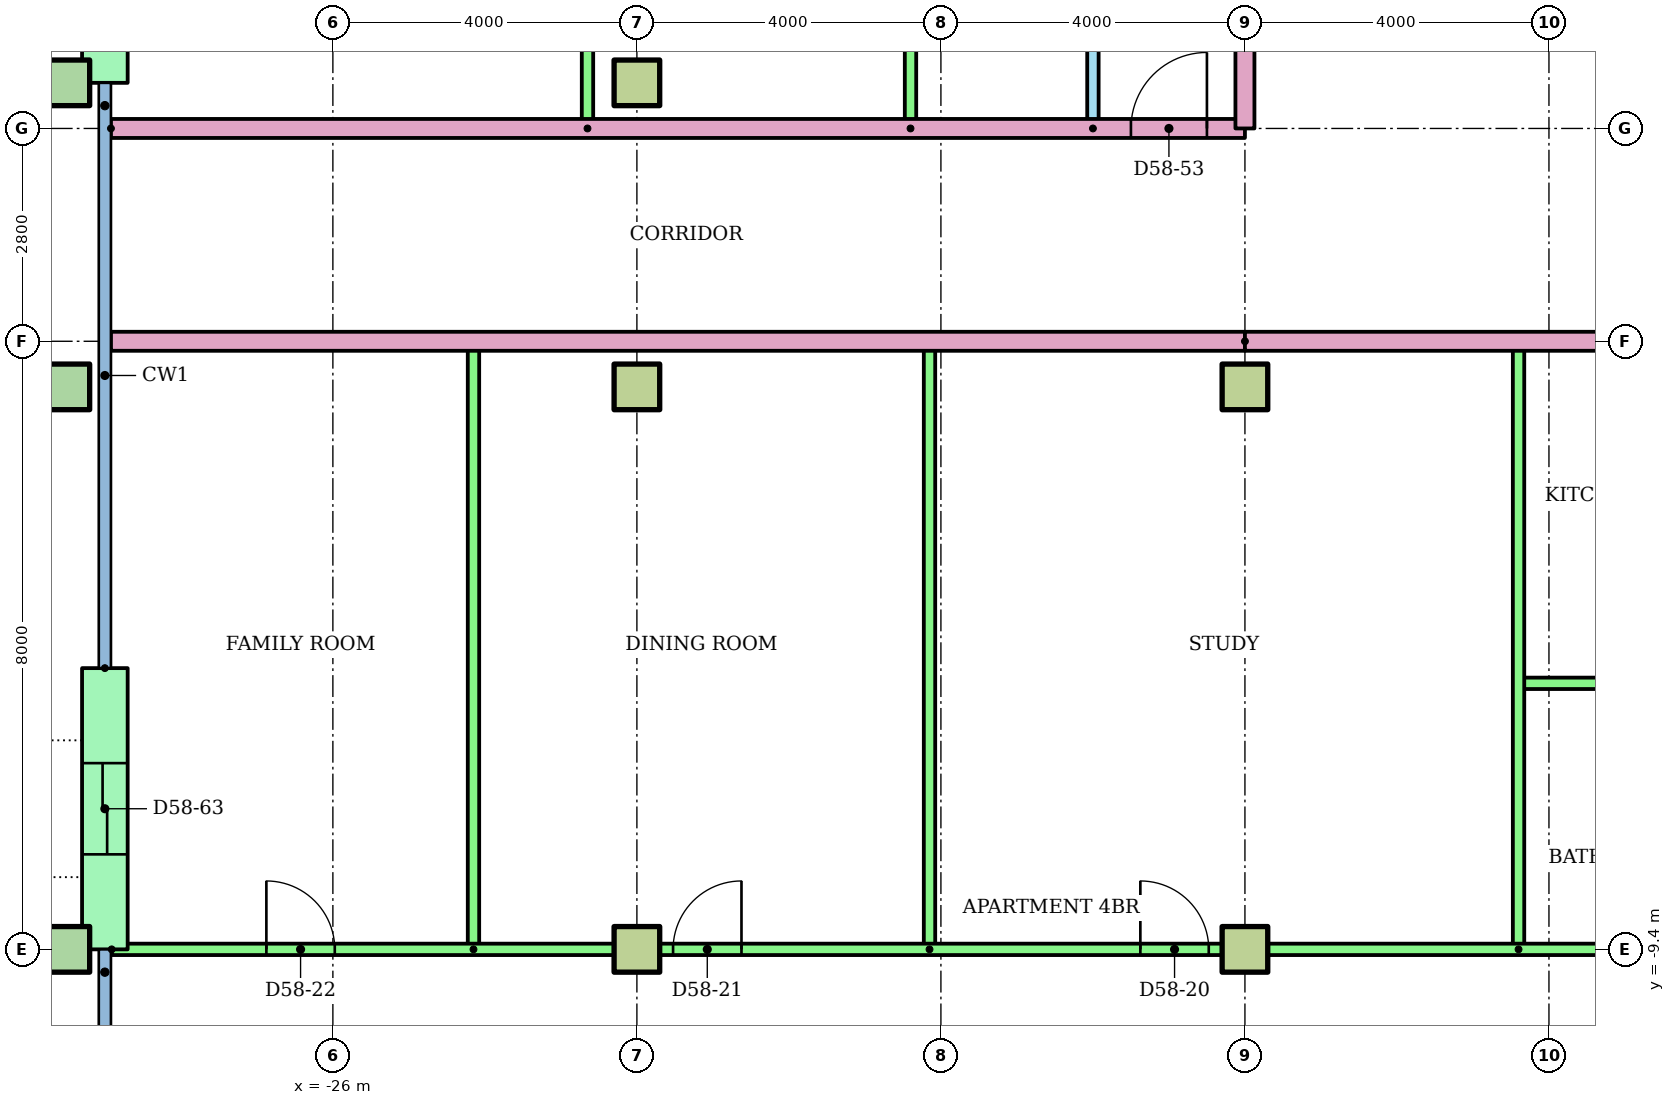
"""IFC4 building model, lengths in metres.
Left out: names, types, materials, properties, quantities, classifications, styles, units other than length and angle.
Written with IfcOpenShell. Run it as: python <this file> out.ifc"""

import sys

from ifc_helpers import new_model, si_unit, direction, frame, frame_2d, origin, origin_2d, place, context, subcontext, project, spatial, rectangle, hollow_rectangle, extrude, element, fill, save


model = new_model("IFC4")
c1 = context("Model", 3, precision=1e-05, world=origin(), true_north=direction((0.0, 1.0)))
c2 = subcontext(c1, "Body", "Model", "MODEL_VIEW")
j1 = project(units=[si_unit("LENGTHUNIT", "METRE"), si_unit("PLANEANGLEUNIT", "RADIAN")], contexts=[c1])
p1 = place(None, origin())
s1 = spatial("IfcSite", under=j1, at=p1, CompositionType="ELEMENT")
p2 = place(p1, origin())
s2 = spatial("IfcBuilding", under=s1, at=p2, CompositionType="ELEMENT")
p3 = place(p2, frame((0.0, 0.0, 223.6)))
s3 = spatial("IfcBuildingStorey", under=s2, at=p3, CompositionType="ELEMENT", Elevation=223.6)
p4 = place(p3, frame((-29.5, -9.4, 0.0)))
e1 = element("IfcColumn", 1, at=p4, inside=s3, PredefinedType="COLUMN", context=c2, shape_type="SweptSolid", body=[
    extrude(hollow_rectangle(XDim=0.6, YDim=0.6, WallThickness=0.03, at=origin_2d()), origin(), (0.0, 0.0, 1.0), 3.2),
])
for number, where in (
    (2, (-22.0, -9.4, 0.0)),
    (3, (-14.0, -9.4, 0.0)),
):
    element("IfcColumn", number, at=place(p3, frame(where)), inside=s3, PredefinedType="COLUMN", context=c2, shape_type="SweptSolid", body=[
        extrude(rectangle(XDim=0.6, YDim=0.6, at=origin_2d()), origin(), (0.0, 0.0, 1.0), 3.2),
    ])
p5 = place(p3, frame((-29.5, -2.0, 0.0)))
e4 = element("IfcColumn", 4, at=p5, inside=s3, PredefinedType="COLUMN", context=c2, shape_type="SweptSolid", body=[
    extrude(hollow_rectangle(XDim=0.6, YDim=0.6, WallThickness=0.03, at=origin_2d()), origin(), (0.0, 0.0, 1.0), 3.2),
])
for number, where in (
    (5, (-22.0, -2.0, 0.0)),
    (6, (-14.0, -2.0, 0.0)),
):
    element("IfcColumn", number, at=place(p3, frame(where)), inside=s3, PredefinedType="COLUMN", context=c2, shape_type="SweptSolid", body=[
        extrude(rectangle(XDim=0.6, YDim=0.6, at=origin_2d()), origin(), (0.0, 0.0, 1.0), 3.2),
    ])
p6 = place(p3, frame((-29.5, 2.0, 0.0)))
e7 = element("IfcColumn", 7, at=p6, inside=s3, PredefinedType="COLUMN", context=c2, shape_type="SweptSolid", body=[
    extrude(hollow_rectangle(XDim=0.6, YDim=0.6, WallThickness=0.03, at=origin_2d()), origin(), (0.0, 0.0, 1.0), 3.2),
])
p7 = place(p3, frame((-22.0, 2.0, 0.0)))
e8 = element("IfcColumn", 8, at=p7, inside=s3, PredefinedType="COLUMN", context=c2, shape_type="SweptSolid", body=[
    extrude(rectangle(XDim=0.6, YDim=0.6, at=origin_2d()), origin(), (0.0, 0.0, 1.0), 3.2),
])
p8 = place(p3, frame((-29.0, 6.5, 0.0), z_axis=(0.0, 0.0, 1.0), x_axis=(0.0, -1.0, 0.0)))
e9 = element("IfcWall", 9, at=p8, inside=s3, PredefinedType="STANDARD", context=c2, shape_type="SweptSolid", body=[
    extrude(rectangle(XDim=4.5, YDim=0.6, at=frame_2d((2.25, 0.0))), origin(), (0.0, 0.0, 1.0), 2.92),
])
p9 = place(p8, frame((1.65, 0.0, 0.0)))
e10 = element("IfcOpeningElement", 10, at=p9, cuts=e9, PredefinedType="OPENING", context=c2, shape_type="SweptSolid", body=[
    extrude(rectangle(XDim=1.2, YDim=2.1, at=frame_2d((0.6, 1.05))), frame((0.0, 0.31, 0.0), z_axis=(0.0, -1.0, 0.0), x_axis=(1.0, 0.0, 0.0)), (0.0, 0.0, 1.0), 0.62),
])
p10 = place(p3, frame((-29.0, -5.7, 0.0), z_axis=(0.0, 0.0, 1.0), x_axis=(0.0, -1.0, 0.0)))
e11 = element("IfcWall", 11, at=p10, inside=s3, PredefinedType="STANDARD", context=c2, shape_type="SweptSolid", body=[
    extrude(rectangle(XDim=3.7, YDim=0.6, at=frame_2d((1.85, 0.0))), origin(), (0.0, 0.0, 1.0), 2.92),
])
p11 = place(p10, frame((1.25, 0.0, 0.0)))
e12 = element("IfcOpeningElement", 12, at=p11, cuts=e11, PredefinedType="OPENING", context=c2, shape_type="SweptSolid", body=[
    extrude(rectangle(XDim=1.2, YDim=2.1, at=frame_2d((0.6, 1.05))), frame((0.0, 0.31, 0.0), z_axis=(0.0, -1.0, 0.0), x_axis=(1.0, 0.0, 0.0)), (0.0, 0.0, 1.0), 0.62),
])
p12 = place(p3, frame((-8.0, -5.9, 0.0), z_axis=(0.0, 0.0, 1.0), x_axis=(-1.0, 0.0, 0.0)))
e13 = element("IfcWall", 13, at=p12, inside=s3, PredefinedType="PARTITIONING", context=c2, shape_type="SweptSolid", body=[
    extrude(rectangle(XDim=2.4, YDim=0.15, at=frame_2d((1.2, 0.0))), origin(), (0.0, 0.0, 1.0), 2.4),
])
for number, where, z_axis, x_axis in (
    (14, (-10.4, -9.4, 0.0), (0.0, 0.0, 1.0), (0.0, 1.0, 0.0)),
    (15, (-18.15, -9.4, 0.0), (0.0, 0.0, 1.0), (0.0, 1.0, 0.0)),
    (16, (-24.15, -9.4, 0.0), (0.0, 0.0, 1.0), (0.0, 1.0, 0.0)),
):
    element("IfcWall", number, at=place(p3, frame(where, z_axis=z_axis, x_axis=x_axis)), inside=s3, PredefinedType="PARTITIONING", context=c2, shape_type="SweptSolid", body=[
        extrude(rectangle(XDim=8.0, YDim=0.15, at=frame_2d((4.0, 0.0))), origin(), (0.0, 0.0, 1.0), 2.4),
    ])
p13 = place(p3, frame((-28.91, -9.4, 0.0)))
e17 = element("IfcWall", 17, at=p13, inside=s3, PredefinedType="PARTITIONING", context=c2, shape_type="SweptSolid", body=[
    extrude(rectangle(XDim=20.91, YDim=0.15, at=frame_2d((10.455, 0.0))), origin(), (0.0, 0.0, 1.0), 2.4),
])
p14 = place(p13, frame((13.534, 0.0, 0.0)))
e18 = element("IfcOpeningElement", 18, at=p14, cuts=e17, PredefinedType="OPENING", context=c2, shape_type="SweptSolid", body=[
    extrude(rectangle(XDim=0.9, YDim=2.1, at=frame_2d((0.45, 1.05))), frame((0.0, 0.085, 0.0), z_axis=(0.0, -1.0, 0.0), x_axis=(1.0, 0.0, 0.0)), (0.0, 0.0, 1.0), 0.17),
])
p15 = place(p13, frame((7.386, 0.0, 0.0)))
e19 = element("IfcOpeningElement", 19, at=p15, cuts=e17, PredefinedType="OPENING", context=c2, shape_type="SweptSolid", body=[
    extrude(rectangle(XDim=0.9, YDim=2.1, at=frame_2d((0.45, 1.05))), frame((0.0, 0.085, 0.0), z_axis=(0.0, -1.0, 0.0), x_axis=(1.0, 0.0, 0.0)), (0.0, 0.0, 1.0), 0.17),
])
p16 = place(p13, frame((2.035, 0.0, 0.0)))
e20 = element("IfcOpeningElement", 20, at=p16, cuts=e17, PredefinedType="OPENING", context=c2, shape_type="SweptSolid", body=[
    extrude(rectangle(XDim=0.9, YDim=2.1, at=frame_2d((0.45, 1.05))), frame((0.0, 0.085, 0.0), z_axis=(0.0, -1.0, 0.0), x_axis=(1.0, 0.0, 0.0)), (0.0, 0.0, 1.0), 0.17),
])
p17 = place(p3, frame((-14.0, -1.4, 0.0), z_axis=(0.0, 0.0, 1.0), x_axis=(-1.0, 0.0, 0.0)))
e21 = element("IfcWall", 21, at=p17, inside=s3, PredefinedType="PARTITIONING", context=c2, shape_type="SweptSolid", body=[
    extrude(rectangle(XDim=14.92, YDim=0.25, at=frame_2d((7.46, 0.0))), origin(), (0.0, 0.0, 1.0), 2.4),
])
p18 = place(p3, frame((-16.0, 1.4, 0.0), z_axis=(0.0, 0.0, 1.0), x_axis=(0.0, 1.0, 0.0)))
e22 = element("IfcWall", 22, at=p18, inside=s3, PredefinedType="PARTITIONING", context=c2, shape_type="SweptSolid", body=[
    extrude(rectangle(XDim=10.4, YDim=0.15, at=frame_2d((5.2, 0.0))), origin(), (0.0, 0.0, 1.0), 2.4),
])
p19 = place(p18, frame((2.425, 0.0, 0.0)))
e23 = element("IfcOpeningElement", 23, at=p19, cuts=e22, PredefinedType="OPENING", context=c2, shape_type="SweptSolid", body=[
    extrude(rectangle(XDim=0.9, YDim=2.1, at=frame_2d((0.45, 1.05))), frame((0.0, 0.085, 0.0), z_axis=(0.0, -1.0, 0.0), x_axis=(1.0, 0.0, 0.0)), (0.0, 0.0, 1.0), 0.17),
])
p20 = place(p18, frame((7.675, 0.0, 0.0)))
e24 = element("IfcOpeningElement", 24, at=p20, cuts=e22, PredefinedType="OPENING", context=c2, shape_type="SweptSolid", body=[
    extrude(rectangle(XDim=0.8, YDim=2.1, at=frame_2d((0.4, 1.05))), frame((0.0, 0.085, 0.0), z_axis=(0.0, -1.0, 0.0), x_axis=(1.0, 0.0, 0.0)), (0.0, 0.0, 1.0), 0.17),
])
for number, where, z_axis, x_axis in (
    (25, (-18.4, 1.4, 0.0), (0.0, 0.0, 1.0), (0.0, 1.0, 0.0)),
    (26, (-22.65, 1.4, 0.0), (0.0, 0.0, 1.0), (0.0, 1.0, 0.0)),
):
    element("IfcWall", number, at=place(p3, frame(where, z_axis=z_axis, x_axis=x_axis)), inside=s3, PredefinedType="PARTITIONING", context=c2, shape_type="SweptSolid", body=[
        extrude(rectangle(XDim=10.4, YDim=0.15, at=frame_2d((5.2, 0.0))), origin(), (0.0, 0.0, 1.0), 2.4),
    ])
p21 = place(p3, frame((-28.92, 1.4, 0.0)))
e27 = element("IfcWall", 27, at=p21, inside=s3, PredefinedType="PARTITIONING", context=c2, shape_type="SweptSolid", body=[
    extrude(rectangle(XDim=14.92, YDim=0.25, at=frame_2d((7.46, 0.0))), origin(), (0.0, 0.0, 1.0), 2.4),
])
p22 = place(p21, frame((13.42, 0.0, 0.0)))
e28 = element("IfcOpeningElement", 28, at=p22, cuts=e27, PredefinedType="OPENING", context=c2, shape_type="SweptSolid", body=[
    extrude(rectangle(XDim=1.0, YDim=2.1, at=frame_2d((0.5, 1.05))), frame((0.0, 0.135, 0.0), z_axis=(0.0, -1.0, 0.0), x_axis=(1.0, 0.0, 0.0)), (0.0, 0.0, 1.0), 0.27),
])
p23 = place(p3, frame((14.0, -1.4, 0.0), z_axis=(0.0, 0.0, 1.0), x_axis=(-1.0, 0.0, 0.0)))
e29 = element("IfcWall", 29, at=p23, inside=s3, PredefinedType="PARTITIONING", context=c2, shape_type="SweptSolid", body=[
    extrude(rectangle(XDim=28.0, YDim=0.25, at=frame_2d((14.0, 0.0))), origin(), (0.0, 0.0, 1.0), 2.4),
])
p24 = place(p23, frame((20.5, 0.0, 0.0)))
e30 = element("IfcOpeningElement", 30, at=p24, cuts=e29, PredefinedType="OPENING", context=c2, shape_type="SweptSolid", body=[
    extrude(rectangle(XDim=1.0, YDim=2.1, at=frame_2d((0.5, 1.05))), frame((0.0, 0.135, 0.0), z_axis=(0.0, -1.0, 0.0), x_axis=(1.0, 0.0, 0.0)), (0.0, 0.0, 1.0), 0.27),
])
p25 = place(p23, frame((12.5, 0.0, 0.0)))
e31 = element("IfcOpeningElement", 31, at=p25, cuts=e29, PredefinedType="OPENING", context=c2, shape_type="SweptSolid", body=[
    extrude(rectangle(XDim=1.0, YDim=2.1, at=frame_2d((0.5, 1.05))), frame((0.0, 0.135, 0.0), z_axis=(0.0, -1.0, 0.0), x_axis=(1.0, 0.0, 0.0)), (0.0, 0.0, 1.0), 0.27),
])
p26 = place(p23, frame((10.5, 0.0, 0.0)))
e32 = element("IfcOpeningElement", 32, at=p26, cuts=e29, PredefinedType="OPENING", context=c2, shape_type="SweptSolid", body=[
    extrude(rectangle(XDim=1.0, YDim=2.1, at=frame_2d((0.5, 1.05))), frame((0.0, 0.135, 0.0), z_axis=(0.0, -1.0, 0.0), x_axis=(1.0, 0.0, 0.0)), (0.0, 0.0, 1.0), 0.27),
])
p27 = place(p3, frame((-14.0, 3.0, 0.0), z_axis=(0.0, 0.0, 1.0), x_axis=(0.0, -1.0, 0.0)))
e33 = element("IfcWall", 33, at=p27, inside=s3, PredefinedType="PARTITIONING", context=c2, shape_type="SweptSolid", body=[
    extrude(rectangle(XDim=1.6, YDim=0.25, at=frame_2d((0.8, 0.0))), origin(), (0.0, 0.0, 1.0), 2.4),
])
p28 = place(p14, origin())
e34 = element("IfcDoor", 34, at=p28, inside=s3, OperationType="SINGLE_SWING_LEFT", PredefinedType="DOOR", context=c2, shape_type="SweptSolid", body=[
    extrude(rectangle(XDim=0.9, YDim=2.1, at=frame_2d((0.45, 1.05))), frame((0.0, 0.025, 0.0), z_axis=(0.0, -1.0, 0.0), x_axis=(1.0, 0.0, 0.0)), (0.0, 0.0, 1.0), 0.05),
])
fill(e18, e34)
p29 = place(p15, origin())
e35 = element("IfcDoor", 35, at=p29, inside=s3, OperationType="SINGLE_SWING_RIGHT", PredefinedType="DOOR", context=c2, shape_type="SweptSolid", body=[
    extrude(rectangle(XDim=0.9, YDim=2.1, at=frame_2d((0.45, 1.05))), frame((0.0, 0.025, 0.0), z_axis=(0.0, -1.0, 0.0), x_axis=(1.0, 0.0, 0.0)), (0.0, 0.0, 1.0), 0.05),
])
fill(e19, e35)
p30 = place(p16, origin())
e36 = element("IfcDoor", 36, at=p30, inside=s3, OperationType="SINGLE_SWING_LEFT", PredefinedType="DOOR", context=c2, shape_type="SweptSolid", body=[
    extrude(rectangle(XDim=0.9, YDim=2.1, at=frame_2d((0.45, 1.05))), frame((0.0, 0.025, 0.0), z_axis=(0.0, -1.0, 0.0), x_axis=(1.0, 0.0, 0.0)), (0.0, 0.0, 1.0), 0.05),
])
fill(e20, e36)
p31 = place(p22, origin())
e37 = element("IfcDoor", 37, at=p31, inside=s3, OperationType="SINGLE_SWING_RIGHT", PredefinedType="DOOR", context=c2, shape_type="SweptSolid", body=[
    extrude(rectangle(XDim=1.0, YDim=2.1, at=frame_2d((0.5, 1.05))), frame((0.0, 0.025, 0.0), z_axis=(0.0, -1.0, 0.0), x_axis=(1.0, 0.0, 0.0)), (0.0, 0.0, 1.0), 0.05),
])
fill(e28, e37)
p32 = place(p11, origin())
e38 = element("IfcDoor", 38, at=p32, inside=s3, OperationType="SLIDING_TO_LEFT", PredefinedType="DOOR", context=c2, shape_type="SweptSolid", body=[
    extrude(rectangle(XDim=1.2, YDim=2.1, at=frame_2d((0.6, 1.05))), frame((0.0, 0.025, 0.0), z_axis=(0.0, -1.0, 0.0), x_axis=(1.0, 0.0, 0.0)), (0.0, 0.0, 1.0), 0.05),
])
fill(e12, e38)
save(model, sys.argv[1])
